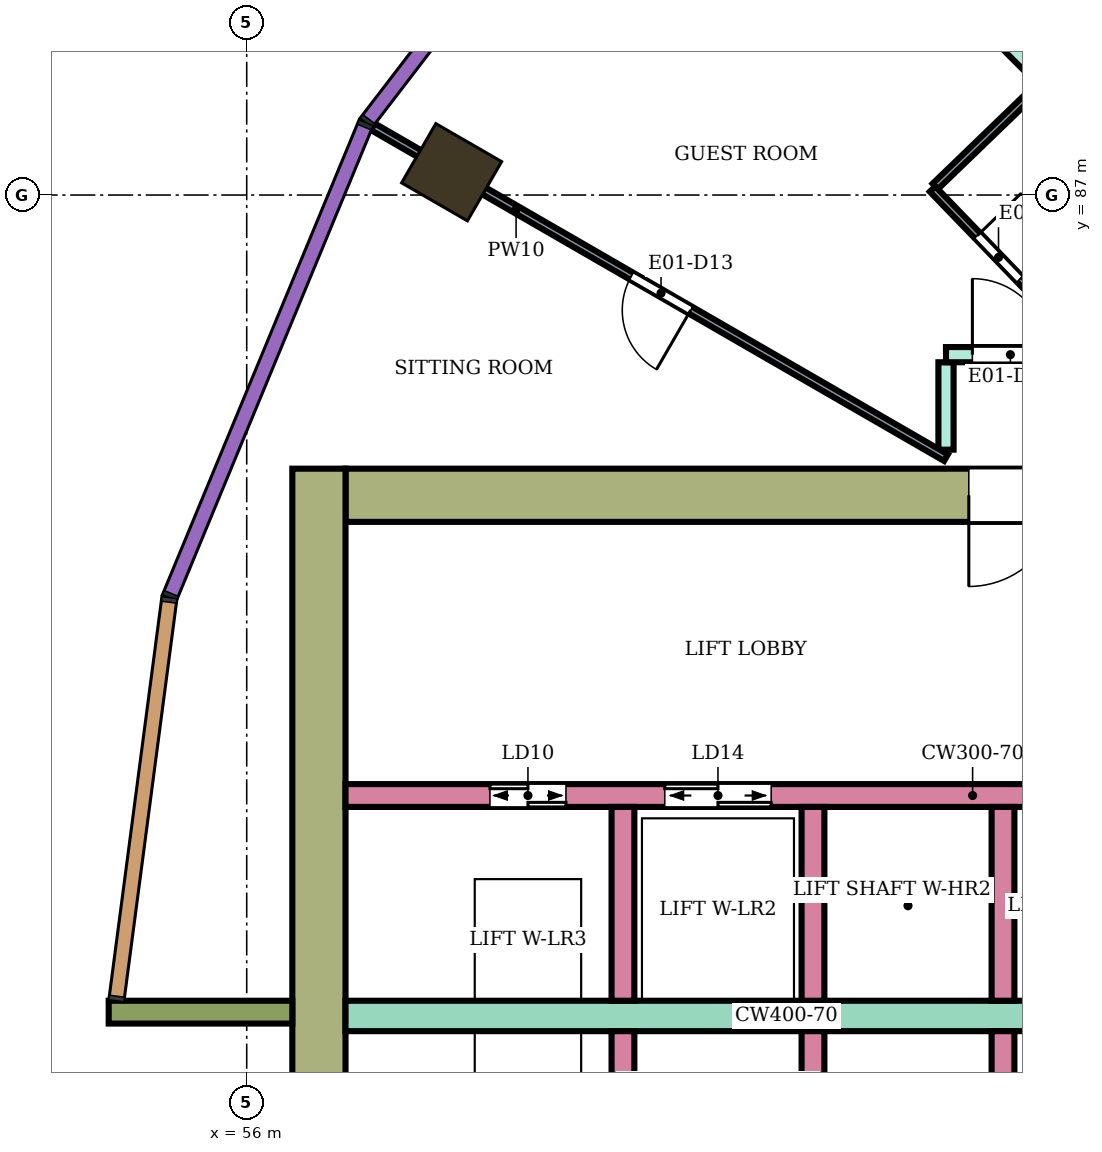
"""IFC4 building model, lengths in metres.
Left out: names, types, materials, properties, quantities, classifications, styles, units other than length and angle.
Written with IfcOpenShell. Run it as: python <this file> out.ifc"""

import sys

from ifc_helpers import new_model, si_unit, direction, frame, frame_2d, origin, origin_2d, place, context, subcontext, project, spatial, rectangle, extrude, element, fill, save


model = new_model("IFC4")
c1 = context("Model", 3, precision=1e-05, world=origin(), true_north=direction((0.0, 1.0)))
c2 = subcontext(c1, "Body", "Model", "MODEL_VIEW")
j1 = project(units=[si_unit("LENGTHUNIT", "METRE"), si_unit("PLANEANGLEUNIT", "RADIAN")], contexts=[c1])
p1 = place(None, origin())
s1 = spatial("IfcSite", under=j1, at=p1, CompositionType="ELEMENT")
p2 = place(p1, origin())
s2 = spatial("IfcBuilding", under=s1, at=p2, CompositionType="ELEMENT")
p3 = place(p2, frame((0.0, 0.0, 118.5)))
s3 = spatial("IfcBuildingStorey", under=s2, at=p3, CompositionType="ELEMENT", Elevation=118.5)
p4 = place(p3, frame((58.696, 87.3, 0.0), z_axis=(0.0, 0.0, 1.0), x_axis=(-0.866025403784, 0.5, 0.0)))
e1 = element("IfcColumn", 1, at=p4, inside=s3, PredefinedType="COLUMN", context=c2, shape_type="SweptSolid", body=[
    extrude(rectangle(XDim=1.0, YDim=0.9, at=origin_2d()), origin(), (0.0, 0.0, 1.0), 3.9),
])
p5 = place(p3, frame((72.1, 83.05, 0.0), z_axis=(0.0, 0.0, 1.0), x_axis=(-1.0, 0.0, 0.0)))
e2 = element("IfcWall", 2, at=p5, inside=s3, PredefinedType="SHEAR", context=c2, shape_type="SweptSolid", body=[
    extrude(rectangle(XDim=14.8, YDim=0.7, at=frame_2d((7.4, 0.0))), origin(), (0.0, 0.0, 1.0), 3.58),
])
p6 = place(p5, frame((4.2, 0.0, 0.0)))
e3 = element("IfcOpeningElement", 3, at=p6, cuts=e2, PredefinedType="OPENING", context=c2, shape_type="SweptSolid", body=[
    extrude(rectangle(XDim=2.4, YDim=2.4, at=frame_2d((1.2, 1.2))), frame((0.0, 0.36, 0.0), z_axis=(0.0, -1.0, 0.0), x_axis=(1.0, 0.0, 0.0)), (0.0, 0.0, 1.0), 0.72),
])
p7 = place(p3, frame((56.95, 83.4, 0.0), z_axis=(0.0, 0.0, 1.0), x_axis=(0.0, -1.0, 0.0)))
e4 = element("IfcWall", 4, at=p7, inside=s3, PredefinedType="SHEAR", context=c2, shape_type="SweptSolid", body=[
    extrude(rectangle(XDim=16.8, YDim=0.7, at=frame_2d((8.4, 0.0))), origin(), (0.0, 0.0, 1.0), 3.58),
])
p8 = place(p3, frame((68.3, 76.2, 0.0), z_axis=(0.0, 0.0, 1.0), x_axis=(-1.0, 0.0, 0.0)))
e5 = element("IfcWall", 5, at=p8, inside=s3, PredefinedType="SHEAR", context=c2, shape_type="SweptSolid", body=[
    extrude(rectangle(XDim=11.0, YDim=0.4, at=frame_2d((5.5, 0.0))), origin(), (0.0, 0.0, 1.0), 3.58),
])
p9 = place(p3, frame((68.3, 79.1, 0.0), z_axis=(0.0, 0.0, 1.0), x_axis=(-1.0, 0.0, 0.0)))
e6 = element("IfcWall", 6, at=p9, inside=s3, PredefinedType="SHEAR", context=c2, shape_type="SweptSolid", body=[
    extrude(rectangle(XDim=11.0, YDim=0.3, at=frame_2d((5.5, 0.0))), origin(), (0.0, 0.0, 1.0), 3.58),
])
p10 = place(p9, frame((0.4, 0.0, 0.0)))
e7 = element("IfcOpeningElement", 7, at=p10, cuts=e6, PredefinedType="OPENING", context=c2, shape_type="SweptSolid", body=[
    extrude(rectangle(XDim=1.4, YDim=2.1, at=frame_2d((0.7, 1.05))), frame((0.0, 0.16, 0.0), z_axis=(0.0, -1.0, 0.0), x_axis=(1.0, 0.0, 0.0)), (0.0, 0.0, 1.0), 0.32),
])
p11 = place(p9, frame((5.4, 0.0, 0.0)))
e8 = element("IfcOpeningElement", 8, at=p11, cuts=e6, PredefinedType="OPENING", context=c2, shape_type="SweptSolid", body=[
    extrude(rectangle(XDim=1.4, YDim=2.1, at=frame_2d((0.7, 1.05))), frame((0.0, 0.16, 0.0), z_axis=(0.0, -1.0, 0.0), x_axis=(1.0, 0.0, 0.0)), (0.0, 0.0, 1.0), 0.32),
])
p12 = place(p9, frame((8.1, 0.0, 0.0)))
e9 = element("IfcOpeningElement", 9, at=p12, cuts=e6, PredefinedType="OPENING", context=c2, shape_type="SweptSolid", body=[
    extrude(rectangle(XDim=1.0, YDim=2.1, at=frame_2d((0.5, 1.05))), frame((0.0, 0.16, 0.0), z_axis=(0.0, -1.0, 0.0), x_axis=(1.0, 0.0, 0.0)), (0.0, 0.0, 1.0), 0.32),
])
for number, where, z_axis, x_axis in (
    (10, (65.95, 76.0, 0.0), (0.0, 0.0, 1.0), (0.0, -1.0, 0.0)),
    (11, (63.45, 76.0, 0.0), (0.0, 0.0, 1.0), (0.0, -1.0, 0.0)),
    (12, (60.95, 76.0, 0.0), (0.0, 0.0, 1.0), (0.0, -1.0, 0.0)),
    (13, (65.95, 78.95, 0.0), (0.0, 0.0, 1.0), (0.0, -1.0, 0.0)),
    (14, (63.45, 78.95, 0.0), (0.0, 0.0, 1.0), (0.0, -1.0, 0.0)),
    (15, (60.95, 78.95, 0.0), (0.0, 0.0, 1.0), (0.0, -1.0, 0.0)),
):
    element("IfcWall", number, at=place(p3, frame(where, z_axis=z_axis, x_axis=x_axis)), inside=s3, PredefinedType="SHEAR", context=c2, shape_type="SweptSolid", body=[
        extrude(rectangle(XDim=2.55, YDim=0.3, at=frame_2d((1.275, 0.0))), origin(), (0.0, 0.0, 1.0), 3.58),
    ])
p13 = place(p3, frame((56.6, 76.25, 0.0), z_axis=(0.0, 0.0, 1.0), x_axis=(-1.0, 0.0, 0.0)))
e16 = element("IfcWall", 16, at=p13, inside=s3, PredefinedType="NOTDEFINED", context=c2, shape_type="SweptSolid", body=[
    extrude(rectangle(XDim=2.416, YDim=0.3, at=frame_2d((1.208, 0.0))), origin(), (0.0, 0.0, 1.0), 3.9),
])
p14 = place(p3, frame((63.598, 91.408, 0.0), z_axis=(0.0, 0.0, 1.0), x_axis=(0.706963264491, -0.707250268759, 0.0)))
e17 = element("IfcWall", 17, at=p14, inside=s3, PredefinedType="PARTITIONING", context=c2, shape_type="SweptSolid", body=[
    extrude(rectangle(XDim=6.805, YDim=0.2, at=frame_2d((3.403, 0.0))), origin(), (0.0, 0.0, 1.0), 3.45),
])
p15 = place(p3, frame((65.2, 83.65, 0.0), z_axis=(0.0, 0.0, 1.0), x_axis=(0.0, 1.0, 0.0)))
e18 = element("IfcWall", 18, at=p15, inside=s3, PredefinedType="PARTITIONING", context=c2, shape_type="SweptSolid", body=[
    extrude(rectangle(XDim=1.15, YDim=0.2, at=frame_2d((0.575, 0.0))), origin(), (0.0, 0.0, 1.0), 3.45),
])
p16 = place(p3, frame((65.2, 84.9, 0.0), z_axis=(0.0, 0.0, 1.0), x_axis=(1.0, 0.0, 0.0)))
e19 = element("IfcWall", 19, at=p16, inside=s3, PredefinedType="PARTITIONING", context=c2, shape_type="SweptSolid", body=[
    extrude(rectangle(XDim=1.537, YDim=0.2, at=frame_2d((0.769, 0.0))), origin(), (0.0, 0.0, 1.0), 3.45),
])
p17 = place(p16, frame((0.347, 0.0, 0.0)))
e20 = element("IfcOpeningElement", 20, at=p17, cuts=e19, PredefinedType="OPENING", context=c2, shape_type="SweptSolid", body=[
    extrude(rectangle(XDim=1.0, YDim=2.1, at=frame_2d((0.5, 1.05))), frame((0.0, 0.11, 0.0), z_axis=(0.0, -1.0, 0.0), x_axis=(1.0, 0.0, 0.0)), (0.0, 0.0, 1.0), 0.22),
])
p18 = place(p3, frame((57.659, 87.899, 0.0), z_axis=(0.0, 0.0, 1.0), x_axis=(0.86602264145, -0.500004784474, 0.0)))
e21 = element("IfcWall", 21, at=p18, inside=s3, PredefinedType="PARTITIONING", context=c2, shape_type="SweptSolid", body=[
    extrude(rectangle(XDim=8.708, YDim=0.1, at=frame_2d((4.354, 0.0))), origin(), (0.0, 0.0, 1.0), 3.45),
])
p19 = place(p18, frame((3.929, 0.0, 0.0)))
e22 = element("IfcOpeningElement", 22, at=p19, cuts=e21, PredefinedType="OPENING", context=c2, shape_type="SweptSolid", body=[
    extrude(rectangle(XDim=0.9, YDim=2.1, at=frame_2d((0.45, 1.05))), frame((0.0, 0.06, 0.0), z_axis=(0.0, -1.0, 0.0), x_axis=(1.0, 0.0, 0.0)), (0.0, 0.0, 1.0), 0.12),
])
p20 = place(p3, frame((65.059, 87.114, 0.0), z_axis=(0.0, 0.0, 1.0), x_axis=(0.719715847356, 0.694268751324, 0.0)))
e23 = element("IfcWall", 23, at=p20, inside=s3, PredefinedType="PARTITIONING", context=c2, shape_type="SweptSolid", body=[
    extrude(rectangle(XDim=1.9, YDim=0.1, at=frame_2d((0.95, 0.0))), origin(), (0.0, 0.0, 1.0), 3.45),
])
p21 = place(p3, frame((65.023, 87.079, 0.0), z_axis=(0.0, 0.0, 1.0), x_axis=(0.694287838235, -0.719697434815, 0.0)))
e24 = element("IfcWall", 24, at=p21, inside=s3, PredefinedType="PARTITIONING", context=c2, shape_type="SweptSolid", body=[
    extrude(rectangle(XDim=2.7, YDim=0.1, at=frame_2d((1.35, 0.0))), origin(), (0.0, 0.0, 1.0), 3.45),
])
p22 = place(p21, frame((0.85, 0.0, 0.0)))
e25 = element("IfcOpeningElement", 25, at=p22, cuts=e24, PredefinedType="OPENING", context=c2, shape_type="SweptSolid", body=[
    extrude(rectangle(XDim=0.8, YDim=2.1, at=frame_2d((0.4, 1.05))), frame((0.0, 0.06, 0.0), z_axis=(0.0, -1.0, 0.0), x_axis=(1.0, 0.0, 0.0)), (0.0, 0.0, 1.0), 0.12),
])
p23 = place(p17, origin())
e26 = element("IfcDoor", 26, at=p23, inside=s3, OperationType="SINGLE_SWING_LEFT", PredefinedType="DOOR", context=c2, shape_type="SweptSolid", body=[
    extrude(rectangle(XDim=1.0, YDim=2.1, at=frame_2d((0.5, 1.05))), frame((0.0, 0.025, 0.0), z_axis=(0.0, -1.0, 0.0), x_axis=(1.0, 0.0, 0.0)), (0.0, 0.0, 1.0), 0.05),
])
fill(e20, e26)
p24 = place(p22, origin())
e27 = element("IfcDoor", 27, at=p24, inside=s3, OperationType="SINGLE_SWING_LEFT", PredefinedType="DOOR", context=c2, shape_type="SweptSolid", body=[
    extrude(rectangle(XDim=0.8, YDim=2.1, at=frame_2d((0.4, 1.05))), frame((0.0, 0.025, 0.0), z_axis=(0.0, -1.0, 0.0), x_axis=(1.0, 0.0, 0.0)), (0.0, 0.0, 1.0), 0.05),
])
fill(e25, e27)
p25 = place(p19, frame((0.9, 0.0, 0.0), z_axis=(0.0, 0.0, 1.0), x_axis=(-1.0, 0.0, 0.0)))
e28 = element("IfcDoor", 28, at=p25, inside=s3, OperationType="SINGLE_SWING_LEFT", PredefinedType="DOOR", context=c2, shape_type="SweptSolid", body=[
    extrude(rectangle(XDim=0.9, YDim=2.1, at=frame_2d((0.45, 1.05))), frame((0.0, 0.025, 0.0), z_axis=(0.0, -1.0, 0.0), x_axis=(1.0, 0.0, 0.0)), (0.0, 0.0, 1.0), 0.05),
])
fill(e22, e28)
p26 = place(p11, origin())
e29 = element("IfcDoor", 29, at=p26, inside=s3, OperationType="DOUBLE_DOOR_SLIDING", PredefinedType="DOOR", context=c2, shape_type="SweptSolid", body=[
    extrude(rectangle(XDim=1.4, YDim=2.1, at=frame_2d((0.7, 1.05))), frame((0.0, 0.025, 0.0), z_axis=(0.0, -1.0, 0.0), x_axis=(1.0, 0.0, 0.0)), (0.0, 0.0, 1.0), 0.05),
])
fill(e8, e29)
p27 = place(p12, origin())
e30 = element("IfcDoor", 30, at=p27, inside=s3, OperationType="DOUBLE_DOOR_SLIDING", PredefinedType="DOOR", context=c2, shape_type="SweptSolid", body=[
    extrude(rectangle(XDim=1.0, YDim=2.1, at=frame_2d((0.5, 1.05))), frame((0.0, 0.025, 0.0), z_axis=(0.0, -1.0, 0.0), x_axis=(1.0, 0.0, 0.0)), (0.0, 0.0, 1.0), 0.05),
])
fill(e9, e30)
p28 = place(p6, origin())
e31 = element("IfcDoor", 31, at=p28, inside=s3, OperationType="DOUBLE_DOOR_SINGLE_SWING", PredefinedType="DOOR", context=c2, shape_type="SweptSolid", body=[
    extrude(rectangle(XDim=2.4, YDim=2.4, at=frame_2d((1.2, 1.2))), frame((0.0, 0.025, 0.0), z_axis=(0.0, -1.0, 0.0), x_axis=(1.0, 0.0, 0.0)), (0.0, 0.0, 1.0), 0.05),
])
fill(e3, e31)
save(model, sys.argv[1])
